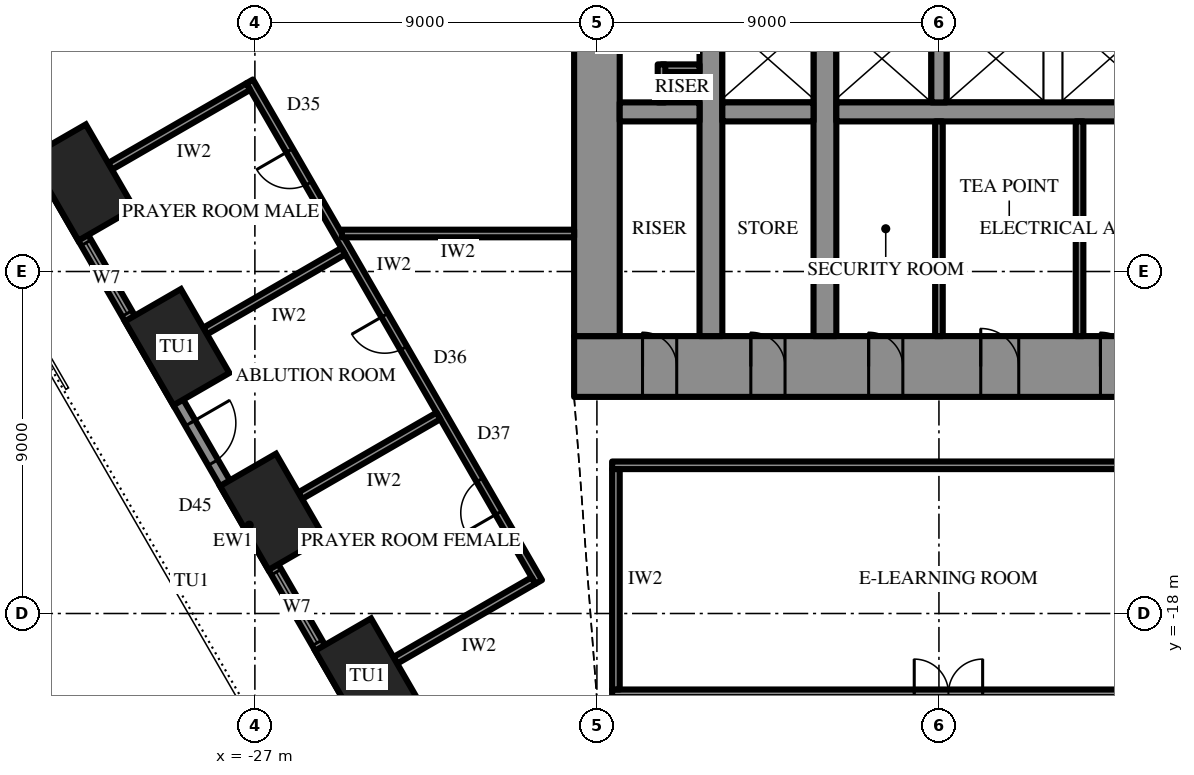
"""IFC4 building model, lengths in metres.
Left out: names, types, materials, properties, quantities, classifications, styles, units other than length and angle.
Written with IfcOpenShell. Run it as: python <this file> out.ifc"""

import sys

from ifc_helpers import new_model, si_unit, direction, frame, frame_2d, origin, origin_2d, place, context, subcontext, project, spatial, rectangle, extrude, element, fill, save


model = new_model("IFC4")
c1 = context("Model", 3, precision=1e-05, world=origin(), true_north=direction((0.0, 1.0)))
c2 = subcontext(c1, "Body", "Model", "MODEL_VIEW")
j1 = project(units=[si_unit("LENGTHUNIT", "METRE"), si_unit("PLANEANGLEUNIT", "RADIAN")], contexts=[c1])
p1 = place(None, origin())
s1 = spatial("IfcSite", under=j1, at=p1, CompositionType="ELEMENT")
p2 = place(p1, origin())
s2 = spatial("IfcBuilding", under=s1, at=p2, CompositionType="ELEMENT")
p3 = place(p2, frame((0.0, 0.0, 119.5)))
s3 = spatial("IfcBuildingStorey", under=s2, at=p3, CompositionType="ELEMENT", Elevation=119.5)
for number, where, z_axis, x_axis in (
    (1, (-31.547, -6.658, 0.0), (0.0, 0.0, 1.0), (0.5, -0.866, 0.0)),
    (2, (-29.045, -10.992, 0.0), (0.0, 0.0, 1.0), (0.5, -0.866, 0.0)),
    (3, (-26.544, -15.325, 0.0), (0.0, 0.0, 1.0), (0.5, -0.866, 0.0)),
    (4, (-24.042, -19.658, 0.0), (0.0, 0.0, 1.0), (0.5, -0.866, 0.0)),
):
    element("IfcColumn", number, at=place(p3, frame(where, z_axis=z_axis, x_axis=x_axis)), inside=s3, PredefinedType="COLUMN", context=c2, shape_type="SweptSolid", body=[
        extrude(rectangle(XDim=2.55, YDim=1.7, at=origin_2d()), origin(), (0.0, 0.0, 1.0), 4.2),
    ])
p4 = place(p3, frame((18.6, -11.5, 0.0), z_axis=(0.0, 0.0, 1.0), x_axis=(-1.0, 0.0, 0.0)))
e5 = element("IfcWall", 5, at=p4, inside=s3, PredefinedType="SHEAR", context=c2, shape_type="SweptSolid", body=[
    extrude(rectangle(XDim=37.2, YDim=1.6, at=frame_2d((18.6, 0.0))), origin(), (0.0, 0.0, 1.0), 4.2),
])
p5 = place(p4, frame((19.45, 0.0, 0.0)))
e6 = element("IfcOpeningElement", 6, at=p5, cuts=e5, PredefinedType="OPENING", context=c2, shape_type="SweptSolid", body=[
    extrude(rectangle(XDim=0.9, YDim=2.2, at=frame_2d((0.45, 1.1))), frame((0.0, 0.81, 0.0), z_axis=(0.0, -1.0, 0.0), x_axis=(1.0, 0.0, 0.0)), (0.0, 0.0, 1.0), 1.62),
])
p6 = place(p4, frame((22.45, 0.0, 0.0)))
e7 = element("IfcOpeningElement", 7, at=p6, cuts=e5, PredefinedType="OPENING", context=c2, shape_type="SweptSolid", body=[
    extrude(rectangle(XDim=0.9, YDim=2.2, at=frame_2d((0.45, 1.1))), frame((0.0, 0.81, 0.0), z_axis=(0.0, -1.0, 0.0), x_axis=(1.0, 0.0, 0.0)), (0.0, 0.0, 1.0), 1.62),
])
p7 = place(p4, frame((25.5, 0.0, 0.0)))
e8 = element("IfcOpeningElement", 8, at=p7, cuts=e5, PredefinedType="OPENING", context=c2, shape_type="SweptSolid", body=[
    extrude(rectangle(XDim=1.0, YDim=2.2, at=frame_2d((0.5, 1.1))), frame((0.0, 0.81, 0.0), z_axis=(0.0, -1.0, 0.0), x_axis=(1.0, 0.0, 0.0)), (0.0, 0.0, 1.0), 1.62),
])
p8 = place(p4, frame((1.8, 0.0, 0.0)))
e9 = element("IfcOpeningElement", 9, at=p8, cuts=e5, PredefinedType="OPENING", context=c2, shape_type="SweptSolid", body=[
    extrude(rectangle(XDim=0.9, YDim=2.2, at=frame_2d((0.45, 1.1))), frame((0.0, 0.81, 0.0), z_axis=(0.0, -1.0, 0.0), x_axis=(1.0, 0.0, 0.0)), (0.0, 0.0, 1.0), 1.62),
])
p9 = place(p4, frame((4.65, 0.0, 0.0)))
e10 = element("IfcOpeningElement", 10, at=p9, cuts=e5, PredefinedType="OPENING", context=c2, shape_type="SweptSolid", body=[
    extrude(rectangle(XDim=0.9, YDim=2.2, at=frame_2d((0.45, 1.1))), frame((0.0, 0.81, 0.0), z_axis=(0.0, -1.0, 0.0), x_axis=(1.0, 0.0, 0.0)), (0.0, 0.0, 1.0), 1.62),
])
p10 = place(p4, frame((7.75, 0.0, 0.0)))
e11 = element("IfcOpeningElement", 11, at=p10, cuts=e5, PredefinedType="OPENING", context=c2, shape_type="SweptSolid", body=[
    extrude(rectangle(XDim=0.9, YDim=2.2, at=frame_2d((0.45, 1.1))), frame((0.0, 0.81, 0.0), z_axis=(0.0, -1.0, 0.0), x_axis=(1.0, 0.0, 0.0)), (0.0, 0.0, 1.0), 1.62),
])
p11 = place(p4, frame((28.55, 0.0, 0.0)))
e12 = element("IfcOpeningElement", 12, at=p11, cuts=e5, PredefinedType="OPENING", context=c2, shape_type="SweptSolid", body=[
    extrude(rectangle(XDim=0.9, YDim=2.2, at=frame_2d((0.45, 1.1))), frame((0.0, 0.81, 0.0), z_axis=(0.0, -1.0, 0.0), x_axis=(1.0, 0.0, 0.0)), (0.0, 0.0, 1.0), 1.62),
])
p12 = place(p4, frame((31.65, 0.0, 0.0)))
e13 = element("IfcOpeningElement", 13, at=p12, cuts=e5, PredefinedType="OPENING", context=c2, shape_type="SweptSolid", body=[
    extrude(rectangle(XDim=0.9, YDim=2.2, at=frame_2d((0.45, 1.1))), frame((0.0, 0.81, 0.0), z_axis=(0.0, -1.0, 0.0), x_axis=(1.0, 0.0, 0.0)), (0.0, 0.0, 1.0), 1.62),
])
p13 = place(p4, frame((34.5, 0.0, 0.0)))
e14 = element("IfcOpeningElement", 14, at=p13, cuts=e5, PredefinedType="OPENING", context=c2, shape_type="SweptSolid", body=[
    extrude(rectangle(XDim=0.9, YDim=2.2, at=frame_2d((0.45, 1.1))), frame((0.0, 0.81, 0.0), z_axis=(0.0, -1.0, 0.0), x_axis=(1.0, 0.0, 0.0)), (0.0, 0.0, 1.0), 1.62),
])
p14 = place(p3, frame((-18.0, 10.7, 0.0), z_axis=(0.0, 0.0, 1.0), x_axis=(0.0, -1.0, 0.0)))
e15 = element("IfcWall", 15, at=p14, inside=s3, PredefinedType="SHEAR", context=c2, shape_type="SweptSolid", body=[
    extrude(rectangle(XDim=21.4, YDim=1.2, at=frame_2d((10.7, 0.0))), origin(), (0.0, 0.0, 1.0), 4.2),
])
p15 = place(p14, frame((9.8, 0.0, 0.0)))
e16 = element("IfcOpeningElement", 16, at=p15, cuts=e15, PredefinedType="OPENING", context=c2, shape_type="SweptSolid", body=[
    extrude(rectangle(XDim=1.8, YDim=2.4, at=frame_2d((0.9, 1.2))), frame((0.0, 0.61, 0.0), z_axis=(0.0, -1.0, 0.0), x_axis=(1.0, 0.0, 0.0)), (0.0, 0.0, 1.0), 1.22),
])
p16 = place(p3, frame((-12.0, -10.7, 0.0), z_axis=(0.0, 0.0, 1.0), x_axis=(0.0, 1.0, 0.0)))
e17 = element("IfcWall", 17, at=p16, inside=s3, PredefinedType="SHEAR", context=c2, shape_type="SweptSolid", body=[
    extrude(rectangle(XDim=21.4, YDim=0.6, at=frame_2d((10.7, 0.0))), origin(), (0.0, 0.0, 1.0), 4.2),
])
p17 = place(p16, frame((9.8, 0.0, 0.0)))
e18 = element("IfcOpeningElement", 18, at=p17, cuts=e17, PredefinedType="OPENING", context=c2, shape_type="SweptSolid", body=[
    extrude(rectangle(XDim=1.8, YDim=2.4, at=frame_2d((0.9, 1.2))), frame((0.0, 0.31, 0.0), z_axis=(0.0, -1.0, 0.0), x_axis=(1.0, 0.0, 0.0)), (0.0, 0.0, 1.0), 0.62),
])
p18 = place(p3, frame((-15.0, -10.7, 0.0), z_axis=(0.0, 0.0, 1.0), x_axis=(0.0, 1.0, 0.0)))
e19 = element("IfcWall", 19, at=p18, inside=s3, PredefinedType="SHEAR", context=c2, shape_type="SweptSolid", body=[
    extrude(rectangle(XDim=21.4, YDim=0.6, at=frame_2d((10.7, 0.0))), origin(), (0.0, 0.0, 1.0), 4.2),
])
p19 = place(p18, frame((9.8, 0.0, 0.0)))
e20 = element("IfcOpeningElement", 20, at=p19, cuts=e19, PredefinedType="OPENING", context=c2, shape_type="SweptSolid", body=[
    extrude(rectangle(XDim=1.8, YDim=2.4, at=frame_2d((0.9, 1.2))), frame((0.0, 0.31, 0.0), z_axis=(0.0, -1.0, 0.0), x_axis=(1.0, 0.0, 0.0)), (0.0, 0.0, 1.0), 0.62),
])
p20 = place(p3, frame((11.7, -4.8, 0.0), z_axis=(0.0, 0.0, 1.0), x_axis=(-1.0, 0.0, 0.0)))
e21 = element("IfcWall", 21, at=p20, inside=s3, PredefinedType="SHEAR", context=c2, shape_type="SweptSolid", body=[
    extrude(rectangle(XDim=23.4, YDim=0.5, at=frame_2d((11.7, 0.0))), origin(), (0.0, 0.0, 1.0), 4.2),
])
p21 = place(p20, frame((6.6, 0.0, 0.0)))
e22 = element("IfcOpeningElement", 22, at=p21, cuts=e21, PredefinedType="OPENING", context=c2, shape_type="SweptSolid", body=[
    extrude(rectangle(XDim=1.2, YDim=2.2, at=frame_2d((0.6, 1.1))), frame((0.0, 0.26, 0.0), z_axis=(0.0, -1.0, 0.0), x_axis=(1.0, 0.0, 0.0)), (0.0, 0.0, 1.0), 0.52),
])
p22 = place(p20, frame((3.6, 0.0, 0.0)))
e23 = element("IfcOpeningElement", 23, at=p22, cuts=e21, PredefinedType="OPENING", context=c2, shape_type="SweptSolid", body=[
    extrude(rectangle(XDim=1.2, YDim=2.2, at=frame_2d((0.6, 1.1))), frame((0.0, 0.26, 0.0), z_axis=(0.0, -1.0, 0.0), x_axis=(1.0, 0.0, 0.0)), (0.0, 0.0, 1.0), 0.52),
])
p23 = place(p3, frame((-12.3, -4.8, 0.0), z_axis=(0.0, 0.0, 1.0), x_axis=(-1.0, 0.0, 0.0)))
e24 = element("IfcWall", 24, at=p23, inside=s3, PredefinedType="SHEAR", context=c2, shape_type="SweptSolid", body=[
    extrude(rectangle(XDim=2.4, YDim=0.5, at=frame_2d((1.2, 0.0))), origin(), (0.0, 0.0, 1.0), 4.2),
])
p24 = place(p3, frame((-15.3, -4.8, 0.0), z_axis=(0.0, 0.0, 1.0), x_axis=(-1.0, 0.0, 0.0)))
e25 = element("IfcWall", 25, at=p24, inside=s3, PredefinedType="SHEAR", context=c2, shape_type="SweptSolid", body=[
    extrude(rectangle(XDim=2.1, YDim=0.5, at=frame_2d((1.05, 0.0))), origin(), (0.0, 0.0, 1.0), 4.2),
])
p25 = place(p3, frame((-9.0, -2.25, 0.0), z_axis=(0.0, 0.0, 1.0), x_axis=(0.0, -1.0, 0.0)))
e26 = element("IfcWall", 26, at=p25, inside=s3, PredefinedType="SHEAR", context=c2, shape_type="SweptSolid", body=[
    extrude(rectangle(XDim=2.3, YDim=0.4, at=frame_2d((1.15, 0.0))), origin(), (0.0, 0.0, 1.0), 4.2),
])
p26 = place(p3, frame((-34.656, -2.675, 0.0), z_axis=(0.0, 0.0, 1.0), x_axis=(0.500003084452, -0.866023622968, 0.0)))
e27 = element("IfcWall", 27, at=p26, inside=s3, PredefinedType="SOLIDWALL", context=c2, shape_type="SweptSolid", body=[
    extrude(rectangle(XDim=30.022, YDim=0.3, at=frame_2d((15.011, 0.0))), origin(), (0.0, 0.0, 1.0), 2.3),
])
p27 = place(p26, frame((1.602, 0.0, 0.6)))
e28 = element("IfcOpeningElement", 28, at=p27, cuts=e27, PredefinedType="OPENING", context=c2, shape_type="SweptSolid", body=[
    extrude(rectangle(XDim=1.8, YDim=1.45, at=frame_2d((0.9, 0.725))), frame((0.0, 0.16, 0.0), z_axis=(0.0, -1.0, 0.0), x_axis=(1.0, 0.0, 0.0)), (0.0, 0.0, 1.0), 0.32),
])
p28 = place(p26, frame((6.431, 0.0, 0.6)))
e29 = element("IfcOpeningElement", 29, at=p28, cuts=e27, PredefinedType="OPENING", context=c2, shape_type="SweptSolid", body=[
    extrude(rectangle(XDim=2.15, YDim=1.45, at=frame_2d((1.075, 0.725))), frame((0.0, 0.16, 0.0), z_axis=(0.0, -1.0, 0.0), x_axis=(1.0, 0.0, 0.0)), (0.0, 0.0, 1.0), 0.32),
])
p29 = place(p26, frame((11.909, 0.0, 0.0)))
e30 = element("IfcOpeningElement", 30, at=p29, cuts=e27, PredefinedType="OPENING", context=c2, shape_type="SweptSolid", body=[
    extrude(rectangle(XDim=1.2, YDim=2.2, at=frame_2d((0.6, 1.1))), frame((0.0, 0.16, 0.0), z_axis=(0.0, -1.0, 0.0), x_axis=(1.0, 0.0, 0.0)), (0.0, 0.0, 1.0), 0.32),
])
p30 = place(p26, frame((16.438, 0.0, 0.6)))
e31 = element("IfcOpeningElement", 31, at=p30, cuts=e27, PredefinedType="OPENING", context=c2, shape_type="SweptSolid", body=[
    extrude(rectangle(XDim=2.15, YDim=1.45, at=frame_2d((1.075, 0.725))), frame((0.0, 0.16, 0.0), z_axis=(0.0, -1.0, 0.0), x_axis=(1.0, 0.0, 0.0)), (0.0, 0.0, 1.0), 0.32),
])
p31 = place(p26, frame((21.442, 0.0, 0.6)))
e32 = element("IfcOpeningElement", 32, at=p31, cuts=e27, PredefinedType="OPENING", context=c2, shape_type="SweptSolid", body=[
    extrude(rectangle(XDim=2.15, YDim=1.45, at=frame_2d((1.075, 0.725))), frame((0.0, 0.16, 0.0), z_axis=(0.0, -1.0, 0.0), x_axis=(1.0, 0.0, 0.0)), (0.0, 0.0, 1.0), 0.32),
])
p32 = place(p26, frame((26.62, 0.0, 0.6)))
e33 = element("IfcOpeningElement", 33, at=p32, cuts=e27, PredefinedType="OPENING", context=c2, shape_type="SweptSolid", body=[
    extrude(rectangle(XDim=1.8, YDim=1.45, at=frame_2d((0.9, 0.725))), frame((0.0, 0.16, 0.0), z_axis=(0.0, -1.0, 0.0), x_axis=(1.0, 0.0, 0.0)), (0.0, 0.0, 1.0), 0.32),
])
for number, where, z_axis, x_axis in (
    (34, (-9.0, -5.05, 0.0), (0.0, 0.0, 1.0), (0.0, -1.0, 0.0)),
    (35, (-5.3, -5.05, 0.0), (0.0, 0.0, 1.0), (0.0, -1.0, 0.0)),
):
    element("IfcWall", number, at=place(p3, frame(where, z_axis=z_axis, x_axis=x_axis)), inside=s3, PredefinedType="PARTITIONING", context=c2, shape_type="SweptSolid", body=[
        extrude(rectangle(XDim=5.65, YDim=0.2, at=frame_2d((2.825, 0.0))), origin(), (0.0, 0.0, 1.0), 4.0),
    ])
for number, where, z_axis, x_axis in (
    (36, (-15.3, -3.65, 0.0), (0.0, 0.0, 1.0), (-1.0, 0.0, 0.0)),
    (37, (-16.3, -3.55, 0.0), (0.0, 0.0, 1.0), (0.0, -1.0, 0.0)),
):
    element("IfcWall", number, at=place(p3, frame(where, z_axis=z_axis, x_axis=x_axis)), inside=s3, PredefinedType="PARTITIONING", context=c2, shape_type="SweptSolid", body=[
        extrude(rectangle(XDim=1.0, YDim=0.2, at=frame_2d((0.5, 0.0))), origin(), (0.0, 0.0, 1.0), 4.0),
    ])
p33 = place(p3, frame((17.6, -14.1, 0.0), z_axis=(0.0, 0.0, 1.0), x_axis=(-1.0, 0.0, 0.0)))
e38 = element("IfcWall", 38, at=p33, inside=s3, PredefinedType="PARTITIONING", context=c2, shape_type="SweptSolid", body=[
    extrude(rectangle(XDim=35.2, YDim=0.2, at=frame_2d((17.6, 0.0))), origin(), (0.0, 0.0, 1.0), 4.0),
])
p34 = place(p3, frame((17.6, -20.1, 0.0), z_axis=(0.0, 0.0, 1.0), x_axis=(-1.0, 0.0, 0.0)))
e39 = element("IfcWall", 39, at=p34, inside=s3, PredefinedType="PARTITIONING", context=c2, shape_type="SweptSolid", body=[
    extrude(rectangle(XDim=35.2, YDim=0.2, at=frame_2d((17.6, 0.0))), origin(), (0.0, 0.0, 1.0), 4.0),
])
p35 = place(p34, frame((7.95, 0.0, 0.0)))
e40 = element("IfcOpeningElement", 40, at=p35, cuts=e39, PredefinedType="OPENING", context=c2, shape_type="SweptSolid", body=[
    extrude(rectangle(XDim=1.8, YDim=2.4, at=frame_2d((0.9, 1.2))), frame((0.0, 0.11, 0.0), z_axis=(0.0, -1.0, 0.0), x_axis=(1.0, 0.0, 0.0)), (0.0, 0.0, 1.0), 0.22),
])
p36 = place(p34, frame((25.45, 0.0, 0.0)))
e41 = element("IfcOpeningElement", 41, at=p36, cuts=e39, PredefinedType="OPENING", context=c2, shape_type="SweptSolid", body=[
    extrude(rectangle(XDim=1.8, YDim=2.4, at=frame_2d((0.9, 1.2))), frame((0.0, 0.11, 0.0), z_axis=(0.0, -1.0, 0.0), x_axis=(1.0, 0.0, 0.0)), (0.0, 0.0, 1.0), 0.22),
])
p37 = place(p3, frame((-17.5, -14.2, 0.0), z_axis=(0.0, 0.0, 1.0), x_axis=(0.0, -1.0, 0.0)))
e42 = element("IfcWall", 42, at=p37, inside=s3, PredefinedType="PARTITIONING", context=c2, shape_type="SweptSolid", body=[
    extrude(rectangle(XDim=5.8, YDim=0.2, at=frame_2d((2.9, 0.0))), origin(), (0.0, 0.0, 1.0), 4.0),
])
p38 = place(p3, frame((-27.137, -3.997, 0.0), z_axis=(0.0, 0.0, 1.0), x_axis=(0.500010972563, -0.86601906868, 0.0)))
e43 = element("IfcWall", 43, at=p38, inside=s3, PredefinedType="PARTITIONING", context=c2, shape_type="SweptSolid", body=[
    extrude(rectangle(XDim=15.211, YDim=0.2, at=frame_2d((7.605, 0.0))), origin(), (0.0, 0.0, 1.0), 4.0),
])
p39 = place(p38, frame((2.102, 0.0, 0.0)))
e44 = element("IfcOpeningElement", 44, at=p39, cuts=e43, PredefinedType="OPENING", context=c2, shape_type="SweptSolid", body=[
    extrude(rectangle(XDim=1.0, YDim=2.2, at=frame_2d((0.5, 1.1))), frame((0.0, 0.11, 0.0), z_axis=(0.0, -1.0, 0.0), x_axis=(1.0, 0.0, 0.0)), (0.0, 0.0, 1.0), 0.22),
])
p40 = place(p38, frame((7.105, 0.0, 0.0)))
e45 = element("IfcOpeningElement", 45, at=p40, cuts=e43, PredefinedType="OPENING", context=c2, shape_type="SweptSolid", body=[
    extrude(rectangle(XDim=1.0, YDim=2.2, at=frame_2d((0.5, 1.1))), frame((0.0, 0.11, 0.0), z_axis=(0.0, -1.0, 0.0), x_axis=(1.0, 0.0, 0.0)), (0.0, 0.0, 1.0), 0.22),
])
p41 = place(p38, frame((12.109, 0.0, 0.0)))
e46 = element("IfcOpeningElement", 46, at=p41, cuts=e43, PredefinedType="OPENING", context=c2, shape_type="SweptSolid", body=[
    extrude(rectangle(XDim=1.0, YDim=2.2, at=frame_2d((0.5, 1.1))), frame((0.0, 0.11, 0.0), z_axis=(0.0, -1.0, 0.0), x_axis=(1.0, 0.0, 0.0)), (0.0, 0.0, 1.0), 0.22),
])
for number, where, z_axis, x_axis in (
    (47, (-27.174, -4.133, 0.0), (0.0, 0.0, 1.0), (-0.866, -0.5, 0.0)),
    (48, (-24.672, -8.467, 0.0), (0.0, 0.0, 1.0), (-0.866, -0.5, 0.0)),
):
    element("IfcWall", number, at=place(p3, frame(where, z_axis=z_axis, x_axis=x_axis)), inside=s3, PredefinedType="PARTITIONING", context=c2, shape_type="SweptSolid", body=[
        extrude(rectangle(XDim=4.2, YDim=0.2, at=frame_2d((2.1, 0.0))), origin(), (0.0, 0.0, 1.0), 3.082),
    ])
p42 = place(p3, frame((-22.17, -12.8, 0.0), z_axis=(0.0, 0.0, 1.0), x_axis=(-0.866049104564, -0.499958946799, 0.0)))
e49 = element("IfcWall", 49, at=p42, inside=s3, PredefinedType="PARTITIONING", context=c2, shape_type="SweptSolid", body=[
    extrude(rectangle(XDim=4.2, YDim=0.2, at=frame_2d((2.1, 0.0))), origin(), (0.0, 0.0, 1.0), 4.0),
])
p43 = place(p3, frame((-19.668, -17.133, 0.0), z_axis=(0.0, 0.0, 1.0), x_axis=(-0.866009402589, -0.500027713859, 0.0)))
e50 = element("IfcWall", 50, at=p43, inside=s3, PredefinedType="PARTITIONING", context=c2, shape_type="SweptSolid", body=[
    extrude(rectangle(XDim=4.2, YDim=0.2, at=frame_2d((2.1, 0.0))), origin(), (0.0, 0.0, 1.0), 3.082),
])
p44 = place(p3, frame((-18.6, -8.0, 0.0), z_axis=(0.0, 0.0, 1.0), x_axis=(-1.0, 0.0, 0.0)))
e51 = element("IfcWall", 51, at=p44, inside=s3, PredefinedType="PARTITIONING", context=c2, shape_type="SweptSolid", body=[
    extrude(rectangle(XDim=6.111, YDim=0.2, at=frame_2d((3.055, 0.0))), origin(), (0.0, 0.0, 1.0), 4.0),
])
p45 = place(p28, origin())
e52 = element("IfcWindow", 52, at=p45, inside=s3, PartitioningType="SINGLE_PANEL", PredefinedType="WINDOW", context=c2, shape_type="SweptSolid", body=[
    extrude(rectangle(XDim=2.15, YDim=1.45, at=frame_2d((1.075, 0.725))), frame((0.0, 0.03, 0.0), z_axis=(0.0, -1.0, 0.0), x_axis=(1.0, 0.0, 0.0)), (0.0, 0.0, 1.0), 0.06),
])
fill(e29, e52)
p46 = place(p29, origin())
e53 = element("IfcDoor", 53, at=p46, inside=s3, OperationType="SINGLE_SWING_RIGHT", PredefinedType="DOOR", context=c2, shape_type="SweptSolid", body=[
    extrude(rectangle(XDim=1.2, YDim=2.2, at=frame_2d((0.6, 1.1))), frame((0.0, 0.025, 0.0), z_axis=(0.0, -1.0, 0.0), x_axis=(1.0, 0.0, 0.0)), (0.0, 0.0, 1.0), 0.05),
])
fill(e30, e53)
p47 = place(p30, origin())
e54 = element("IfcWindow", 54, at=p47, inside=s3, PartitioningType="SINGLE_PANEL", PredefinedType="WINDOW", context=c2, shape_type="SweptSolid", body=[
    extrude(rectangle(XDim=2.15, YDim=1.45, at=frame_2d((1.075, 0.725))), frame((0.0, 0.03, 0.0), z_axis=(0.0, -1.0, 0.0), x_axis=(1.0, 0.0, 0.0)), (0.0, 0.0, 1.0), 0.06),
])
fill(e31, e54)
p48 = place(p6, frame((0.9, 0.0, 0.0), z_axis=(0.0, 0.0, 1.0), x_axis=(-1.0, 0.0, 0.0)))
e55 = element("IfcDoor", 55, at=p48, inside=s3, OperationType="SINGLE_SWING_RIGHT", PredefinedType="DOOR", context=c2, shape_type="SweptSolid", body=[
    extrude(rectangle(XDim=0.9, YDim=2.2, at=frame_2d((0.45, 1.1))), frame((0.0, 0.025, 0.0), z_axis=(0.0, -1.0, 0.0), x_axis=(1.0, 0.0, 0.0)), (0.0, 0.0, 1.0), 0.05),
])
fill(e7, e55)
p49 = place(p7, frame((1.0, 0.0, 0.0), z_axis=(0.0, 0.0, 1.0), x_axis=(-1.0, 0.0, 0.0)))
e56 = element("IfcDoor", 56, at=p49, inside=s3, OperationType="SINGLE_SWING_RIGHT", PredefinedType="DOOR", context=c2, shape_type="SweptSolid", body=[
    extrude(rectangle(XDim=1.0, YDim=2.2, at=frame_2d((0.5, 1.1))), frame((0.0, 0.025, 0.0), z_axis=(0.0, -1.0, 0.0), x_axis=(1.0, 0.0, 0.0)), (0.0, 0.0, 1.0), 0.05),
])
fill(e8, e56)
p50 = place(p11, frame((0.9, 0.0, 0.0), z_axis=(0.0, 0.0, 1.0), x_axis=(-1.0, 0.0, 0.0)))
e57 = element("IfcDoor", 57, at=p50, inside=s3, OperationType="SINGLE_SWING_RIGHT", PredefinedType="DOOR", context=c2, shape_type="SweptSolid", body=[
    extrude(rectangle(XDim=0.9, YDim=2.2, at=frame_2d((0.45, 1.1))), frame((0.0, 0.025, 0.0), z_axis=(0.0, -1.0, 0.0), x_axis=(1.0, 0.0, 0.0)), (0.0, 0.0, 1.0), 0.05),
])
fill(e12, e57)
p51 = place(p12, frame((0.9, 0.0, 0.0), z_axis=(0.0, 0.0, 1.0), x_axis=(-1.0, 0.0, 0.0)))
e58 = element("IfcDoor", 58, at=p51, inside=s3, OperationType="SINGLE_SWING_RIGHT", PredefinedType="DOOR", context=c2, shape_type="SweptSolid", body=[
    extrude(rectangle(XDim=0.9, YDim=2.2, at=frame_2d((0.45, 1.1))), frame((0.0, 0.025, 0.0), z_axis=(0.0, -1.0, 0.0), x_axis=(1.0, 0.0, 0.0)), (0.0, 0.0, 1.0), 0.05),
])
fill(e13, e58)
p52 = place(p13, frame((0.9, 0.0, 0.0), z_axis=(0.0, 0.0, 1.0), x_axis=(-1.0, 0.0, 0.0)))
e59 = element("IfcDoor", 59, at=p52, inside=s3, OperationType="SINGLE_SWING_RIGHT", PredefinedType="DOOR", context=c2, shape_type="SweptSolid", body=[
    extrude(rectangle(XDim=0.9, YDim=2.2, at=frame_2d((0.45, 1.1))), frame((0.0, 0.025, 0.0), z_axis=(0.0, -1.0, 0.0), x_axis=(1.0, 0.0, 0.0)), (0.0, 0.0, 1.0), 0.05),
])
fill(e14, e59)
p53 = place(p36, frame((1.8, 0.0, 0.0), z_axis=(0.0, 0.0, 1.0), x_axis=(-1.0, 0.0, 0.0)))
e60 = element("IfcDoor", 60, at=p53, inside=s3, OperationType="DOUBLE_DOOR_SINGLE_SWING", PredefinedType="DOOR", context=c2, shape_type="SweptSolid", body=[
    extrude(rectangle(XDim=1.8, YDim=2.4, at=frame_2d((0.9, 1.2))), frame((0.0, 0.025, 0.0), z_axis=(0.0, -1.0, 0.0), x_axis=(1.0, 0.0, 0.0)), (0.0, 0.0, 1.0), 0.05),
])
fill(e41, e60)
p54 = place(p39, frame((1.0, 0.0, 0.0), z_axis=(0.0, 0.0, 1.0), x_axis=(-1.0, 0.0, 0.0)))
e61 = element("IfcDoor", 61, at=p54, inside=s3, OperationType="SINGLE_SWING_LEFT", PredefinedType="DOOR", context=c2, shape_type="SweptSolid", body=[
    extrude(rectangle(XDim=1.0, YDim=2.2, at=frame_2d((0.5, 1.1))), frame((0.0, 0.025, 0.0), z_axis=(0.0, -1.0, 0.0), x_axis=(1.0, 0.0, 0.0)), (0.0, 0.0, 1.0), 0.05),
])
fill(e44, e61)
p55 = place(p40, frame((1.0, 0.0, 0.0), z_axis=(0.0, 0.0, 1.0), x_axis=(-1.0, 0.0, 0.0)))
e62 = element("IfcDoor", 62, at=p55, inside=s3, OperationType="SINGLE_SWING_LEFT", PredefinedType="DOOR", context=c2, shape_type="SweptSolid", body=[
    extrude(rectangle(XDim=1.0, YDim=2.2, at=frame_2d((0.5, 1.1))), frame((0.0, 0.025, 0.0), z_axis=(0.0, -1.0, 0.0), x_axis=(1.0, 0.0, 0.0)), (0.0, 0.0, 1.0), 0.05),
])
fill(e45, e62)
p56 = place(p41, frame((1.0, 0.0, 0.0), z_axis=(0.0, 0.0, 1.0), x_axis=(-1.0, 0.0, 0.0)))
e63 = element("IfcDoor", 63, at=p56, inside=s3, OperationType="SINGLE_SWING_RIGHT", PredefinedType="DOOR", context=c2, shape_type="SweptSolid", body=[
    extrude(rectangle(XDim=1.0, YDim=2.2, at=frame_2d((0.5, 1.1))), frame((0.0, 0.025, 0.0), z_axis=(0.0, -1.0, 0.0), x_axis=(1.0, 0.0, 0.0)), (0.0, 0.0, 1.0), 0.05),
])
fill(e46, e63)
save(model, sys.argv[1])
